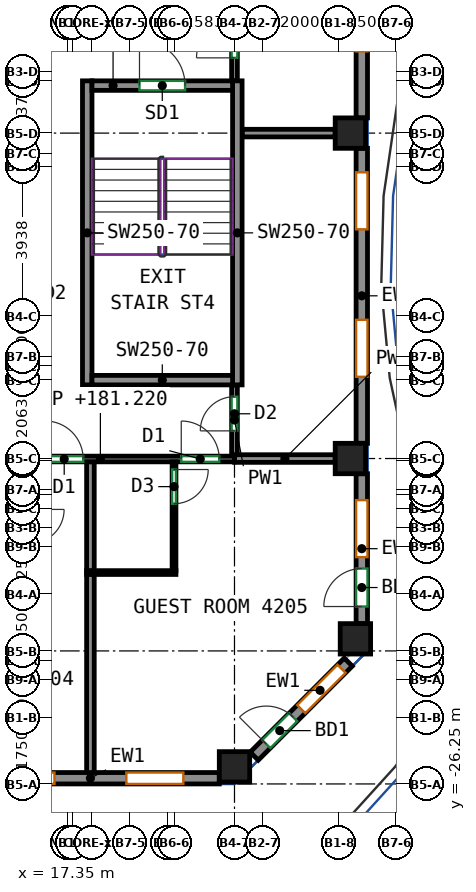
"""IFC4 building model, lengths in metres.
Left out: names, types, materials, properties, quantities, classifications, styles, units other than length and angle.
Written with IfcOpenShell. Run it as: python <this file> out.ifc"""

import sys

from ifc_helpers import new_model, si_unit, direction, frame, frame_2d, origin, origin_2d, place, context, subcontext, project, spatial, rectangle, extrude, source, transform, mapped, element, fill, save


model = new_model("IFC4")
c1 = context("Model", 3, precision=1e-05, world=origin(), true_north=direction((0.0, 1.0)))
c2 = subcontext(c1, "Body", "Model", "MODEL_VIEW")
j1 = project(units=[si_unit("LENGTHUNIT", "METRE"), si_unit("PLANEANGLEUNIT", "RADIAN")], contexts=[c1])
p1 = place(None, origin())
s1 = spatial("IfcSite", under=j1, at=p1, CompositionType="ELEMENT")
p2 = place(p1, origin())
s2 = spatial("IfcBuilding", under=s1, at=p2, CompositionType="ELEMENT")
p3 = place(p2, frame((0.0, 0.0, 178.7)))
s3 = spatial("IfcBuildingStorey", under=s2, at=p3, CompositionType="ELEMENT", Elevation=178.7)
m1 = source(origin(), c2, "Body", "SweptSolid", [
    extrude(rectangle(XDim=0.8, YDim=0.8, at=origin_2d()), origin(), (0.0, 0.0, 1.0), 3.12),
])
for number, where, z_axis, x_axis in (
    (1, (21.75, -25.8, 0.0), (0.0, 0.0, 1.0), (1.0, 0.0, 0.0)),
    (2, (24.8, -17.688, 0.0), (0.0, 0.0, 1.0), (1.0, 0.0, 0.0)),
    (3, (24.8, -9.125, 0.0), (0.0, 0.0, 1.0), (1.0, 0.0, 0.0)),
    (4, (24.932, -22.432, 0.0), (0.0, 0.0, 1.0), (1.0, 0.0, 0.0)),
):
    element("IfcColumn", number, at=place(p3, frame(where, z_axis=z_axis, x_axis=x_axis)), inside=s3, PredefinedType="COLUMN", context=c2, shape_type="MappedRepresentation", body=[
        mapped(m1, transform((0.0, 0.0, 0.0))),
    ])
m2 = source(origin(), c2, "Body", "SweptSolid", [
    extrude(rectangle(XDim=8.0, YDim=0.25, at=frame_2d((4.0, 0.0))), origin(), (0.0, 0.0, 1.0), 3.12),
])
for number, where, z_axis, x_axis in (
    (5, (17.875, -15.75, 0.0), (0.0, 0.0, 1.0), (0.0, 1.0, 0.0)),
    (6, (21.825, -15.75, 0.0), (0.0, 0.0, 1.0), (0.0, 1.0, 0.0)),
):
    element("IfcWall", number, at=place(p3, frame(where, z_axis=z_axis, x_axis=x_axis)), inside=s3, PredefinedType="SHEAR", context=c2, shape_type="MappedRepresentation", body=[
        mapped(m2, transform((0.0, 0.0, 0.0))),
    ])
m3 = source(origin(), c2, "Body", "SweptSolid", [
    extrude(rectangle(XDim=3.7, YDim=0.25, at=frame_2d((1.85, 0.0))), origin(), (0.0, 0.0, 1.0), 3.12),
])
p4 = place(p3, frame((18.0, -15.625, 0.0), z_axis=(0.0, 0.0, 1.0), x_axis=(1.0, 0.0, 0.0)))
e7 = element("IfcWall", 7, at=p4, inside=s3, PredefinedType="SHEAR", context=c2, shape_type="MappedRepresentation", body=[
    mapped(m3, transform((0.0, 0.0, 0.0))),
])
p5 = place(p3, frame((18.0, -7.875, 0.0), z_axis=(0.0, 0.0, 1.0), x_axis=(1.0, 0.0, 0.0)))
e8 = element("IfcWall", 8, at=p5, inside=s3, PredefinedType="SHEAR", context=c2, shape_type="MappedRepresentation", body=[
    mapped(m3, transform((0.0, 0.0, 0.0))),
])
p6 = place(p5, frame((1.25, 0.0, 0.0)))
e9 = element("IfcOpeningElement", 9, at=p6, cuts=e8, PredefinedType="OPENING", context=c2, shape_type="SweptSolid", body=[
    extrude(rectangle(XDim=1.2, YDim=2.1, at=frame_2d((0.6, 1.05))), frame((0.0, 0.135, 0.0), z_axis=(0.0, -1.0, 0.0), x_axis=(1.0, 0.0, 0.0)), (0.0, 0.0, 1.0), 0.27),
])
m4 = source(origin(), c2, "Body", "SweptSolid", [
    extrude(rectangle(XDim=6.783, YDim=0.3, at=frame_2d((3.392, 0.0))), origin(), (0.0, 0.0, 1.0), 3.12),
])
p7 = place(p3, frame((14.567, -26.1, 0.0), z_axis=(0.0, 0.0, 1.0), x_axis=(1.0, 0.0, 0.0)))
e10 = element("IfcWall", 10, at=p7, inside=s3, PredefinedType="SOLIDWALL", context=c2, shape_type="MappedRepresentation", body=[
    mapped(m4, transform((0.0, 0.0, 0.0))),
])
p8 = place(p7, frame((0.946, 0.0, 0.85)))
e11 = element("IfcOpeningElement", 11, at=p8, cuts=e10, PredefinedType="OPENING", context=c2, shape_type="SweptSolid", body=[
    extrude(rectangle(XDim=1.5, YDim=1.95, at=frame_2d((0.75, 0.975))), frame((0.0, 0.16, 0.0), z_axis=(0.0, -1.0, 0.0), x_axis=(1.0, 0.0, 0.0)), (0.0, 0.0, 1.0), 0.32),
])
p9 = place(p7, frame((4.337, 0.0, 0.85)))
e12 = element("IfcOpeningElement", 12, at=p9, cuts=e10, PredefinedType="OPENING", context=c2, shape_type="SweptSolid", body=[
    extrude(rectangle(XDim=1.5, YDim=1.95, at=frame_2d((0.75, 0.975))), frame((0.0, 0.16, 0.0), z_axis=(0.0, -1.0, 0.0), x_axis=(1.0, 0.0, 0.0)), (0.0, 0.0, 1.0), 0.32),
])
m5 = source(origin(), c2, "Body", "SweptSolid", [
    extrude(rectangle(XDim=3.5, YDim=0.3, at=frame_2d((1.75, 0.0))), origin(), (0.0, 0.0, 1.0), 3.12),
])
p10 = place(p3, frame((22.269, -25.519, 0.0), z_axis=(0.0, 0.0, 1.0), x_axis=(0.707141656123, 0.70707190453, 0.0)))
e13 = element("IfcWall", 13, at=p10, inside=s3, PredefinedType="SOLIDWALL", context=c2, shape_type="MappedRepresentation", body=[
    mapped(m5, transform((0.0, 0.0, 0.0))),
])
p11 = place(p10, frame((1.75, 0.0, 0.85)))
e14 = element("IfcOpeningElement", 14, at=p11, cuts=e13, PredefinedType="OPENING", context=c2, shape_type="SweptSolid", body=[
    extrude(rectangle(XDim=1.5, YDim=1.95, at=frame_2d((0.75, 0.975))), frame((0.0, 0.16, 0.0), z_axis=(0.0, -1.0, 0.0), x_axis=(1.0, 0.0, 0.0)), (0.0, 0.0, 1.0), 0.32),
])
p12 = place(p10, frame((0.45, 0.0, 0.0)))
e15 = element("IfcOpeningElement", 15, at=p12, cuts=e13, PredefinedType="OPENING", context=c2, shape_type="SweptSolid", body=[
    extrude(rectangle(XDim=1.0, YDim=2.1, at=frame_2d((0.5, 1.05))), frame((0.0, 0.16, 0.0), z_axis=(0.0, -1.0, 0.0), x_axis=(1.0, 0.0, 0.0)), (0.0, 0.0, 1.0), 0.32),
])
m6 = source(origin(), c2, "Body", "SweptSolid", [
    extrude(rectangle(XDim=3.944, YDim=0.3, at=frame_2d((1.972, 0.0))), origin(), (0.0, 0.0, 1.0), 3.12),
])
p13 = place(p3, frame((25.1, -22.032, 0.0), z_axis=(0.0, 0.0, 1.0), x_axis=(0.0, 1.0, 0.0)))
e16 = element("IfcWall", 16, at=p13, inside=s3, PredefinedType="SOLIDWALL", context=c2, shape_type="MappedRepresentation", body=[
    mapped(m6, transform((0.0, 0.0, 0.0))),
])
p14 = place(p13, frame((1.75, 0.0, 0.85)))
e17 = element("IfcOpeningElement", 17, at=p14, cuts=e16, PredefinedType="OPENING", context=c2, shape_type="SweptSolid", body=[
    extrude(rectangle(XDim=1.5, YDim=1.95, at=frame_2d((0.75, 0.975))), frame((0.0, 0.16, 0.0), z_axis=(0.0, -1.0, 0.0), x_axis=(1.0, 0.0, 0.0)), (0.0, 0.0, 1.0), 0.32),
])
p15 = place(p13, frame((0.45, 0.0, 0.0)))
e18 = element("IfcOpeningElement", 18, at=p15, cuts=e16, PredefinedType="OPENING", context=c2, shape_type="SweptSolid", body=[
    extrude(rectangle(XDim=1.0, YDim=2.1, at=frame_2d((0.5, 1.05))), frame((0.0, 0.16, 0.0), z_axis=(0.0, -1.0, 0.0), x_axis=(1.0, 0.0, 0.0)), (0.0, 0.0, 1.0), 0.32),
])
m7 = source(origin(), c2, "Body", "SweptSolid", [
    extrude(rectangle(XDim=7.763, YDim=0.3, at=frame_2d((3.881, 0.0))), origin(), (0.0, 0.0, 1.0), 3.12),
])
p16 = place(p3, frame((25.1, -17.288, 0.0), z_axis=(0.0, 0.0, 1.0), x_axis=(0.0, 1.0, 0.0)))
e19 = element("IfcWall", 19, at=p16, inside=s3, PredefinedType="SOLIDWALL", context=c2, shape_type="MappedRepresentation", body=[
    mapped(m7, transform((0.0, 0.0, 0.0))),
])
p17 = place(p16, frame((1.75, 0.0, 0.85)))
e20 = element("IfcOpeningElement", 20, at=p17, cuts=e19, PredefinedType="OPENING", context=c2, shape_type="SweptSolid", body=[
    extrude(rectangle(XDim=1.5, YDim=1.95, at=frame_2d((0.75, 0.975))), frame((0.0, 0.16, 0.0), z_axis=(0.0, -1.0, 0.0), x_axis=(1.0, 0.0, 0.0)), (0.0, 0.0, 1.0), 0.32),
])
p18 = place(p16, frame((5.631, 0.0, 0.85)))
e21 = element("IfcOpeningElement", 21, at=p18, cuts=e19, PredefinedType="OPENING", context=c2, shape_type="SweptSolid", body=[
    extrude(rectangle(XDim=1.5, YDim=1.95, at=frame_2d((0.75, 0.975))), frame((0.0, 0.16, 0.0), z_axis=(0.0, -1.0, 0.0), x_axis=(1.0, 0.0, 0.0)), (0.0, 0.0, 1.0), 0.32),
])
p19 = place(p3, frame((25.1, -8.725, 0.0), z_axis=(0.0, 0.0, 1.0), x_axis=(0.0, 1.0, 0.0)))
e22 = element("IfcWall", 22, at=p19, inside=s3, PredefinedType="SOLIDWALL", context=c2, shape_type="MappedRepresentation", body=[
    mapped(m7, transform((0.0, 0.0, 0.0))),
])
p20 = place(p19, frame((1.75, 0.0, 0.85)))
e23 = element("IfcOpeningElement", 23, at=p20, cuts=e22, PredefinedType="OPENING", context=c2, shape_type="SweptSolid", body=[
    extrude(rectangle(XDim=1.5, YDim=1.95, at=frame_2d((0.75, 0.975))), frame((0.0, 0.16, 0.0), z_axis=(0.0, -1.0, 0.0), x_axis=(1.0, 0.0, 0.0)), (0.0, 0.0, 1.0), 0.32),
])
p21 = place(p19, frame((5.631, 0.0, 0.85)))
e24 = element("IfcOpeningElement", 24, at=p21, cuts=e22, PredefinedType="OPENING", context=c2, shape_type="SweptSolid", body=[
    extrude(rectangle(XDim=1.5, YDim=1.95, at=frame_2d((0.75, 0.975))), frame((0.0, 0.16, 0.0), z_axis=(0.0, -1.0, 0.0), x_axis=(1.0, 0.0, 0.0)), (0.0, 0.0, 1.0), 0.32),
])
p22 = place(p19, frame((4.331, 0.0, 0.0)))
e25 = element("IfcOpeningElement", 25, at=p22, cuts=e22, PredefinedType="OPENING", context=c2, shape_type="SweptSolid", body=[
    extrude(rectangle(XDim=1.0, YDim=2.1, at=frame_2d((0.5, 1.05))), frame((0.0, 0.16, 0.0), z_axis=(0.0, -1.0, 0.0), x_axis=(1.0, 0.0, 0.0)), (0.0, 0.0, 1.0), 0.32),
])
p23 = place(p3, frame((14.692, -17.7, 0.0), z_axis=(0.0, 0.0, 1.0), x_axis=(1.0, 0.0, 0.0)))
e26 = element("IfcWall", 26, at=p23, inside=s3, PredefinedType="PARTITIONING", context=c2, shape_type="SweptSolid", body=[
    extrude(rectangle(XDim=7.058, YDim=0.15, at=frame_2d((3.529, 0.0))), origin(), (0.0, 0.0, 1.0), 2.52),
])
p24 = place(p23, frame((2.077, 0.0, 0.0)))
e27 = element("IfcOpeningElement", 27, at=p24, cuts=e26, PredefinedType="OPENING", context=c2, shape_type="SweptSolid", body=[
    extrude(rectangle(XDim=1.0, YDim=2.1, at=frame_2d((0.5, 1.05))), frame((0.0, 0.085, 0.0), z_axis=(0.0, -1.0, 0.0), x_axis=(1.0, 0.0, 0.0)), (0.0, 0.0, 1.0), 0.17),
])
p25 = place(p23, frame((5.657, 0.0, 0.0)))
e28 = element("IfcOpeningElement", 28, at=p25, cuts=e26, PredefinedType="OPENING", context=c2, shape_type="SweptSolid", body=[
    extrude(rectangle(XDim=1.0, YDim=2.1, at=frame_2d((0.5, 1.05))), frame((0.0, 0.085, 0.0), z_axis=(0.0, -1.0, 0.0), x_axis=(1.0, 0.0, 0.0)), (0.0, 0.0, 1.0), 0.17),
])
p26 = place(p3, frame((21.75, -7.75, 0.0), z_axis=(0.0, 0.0, 1.0), x_axis=(0.0, 1.0, 0.0)))
e29 = element("IfcWall", 29, at=p26, inside=s3, PredefinedType="PARTITIONING", context=c2, shape_type="SweptSolid", body=[
    extrude(rectangle(XDim=2.817, YDim=0.15, at=frame_2d((1.408, 0.0))), origin(), (0.0, 0.0, 1.0), 3.12),
])
p27 = place(p26, frame((0.605, 0.0, 0.0)))
e30 = element("IfcOpeningElement", 30, at=p27, cuts=e29, PredefinedType="OPENING", context=c2, shape_type="SweptSolid", body=[
    extrude(rectangle(XDim=1.0, YDim=2.1, at=frame_2d((0.5, 1.05))), frame((0.0, 0.085, 0.0), z_axis=(0.0, -1.0, 0.0), x_axis=(1.0, 0.0, 0.0)), (0.0, 0.0, 1.0), 0.17),
])
p28 = place(p3, frame((21.75, -17.598, 0.0), z_axis=(0.0, 0.0, 1.0), x_axis=(0.0, 1.0, 0.0)))
e31 = element("IfcWall", 31, at=p28, inside=s3, PredefinedType="PARTITIONING", context=c2, shape_type="SweptSolid", body=[
    extrude(rectangle(XDim=1.848, YDim=0.15, at=frame_2d((0.924, 0.0))), origin(), (0.0, 0.0, 1.0), 3.12),
])
p29 = place(p28, frame((0.638, 0.0, 0.0)))
e32 = element("IfcOpeningElement", 32, at=p29, cuts=e31, PredefinedType="OPENING", context=c2, shape_type="SweptSolid", body=[
    extrude(rectangle(XDim=0.9, YDim=2.1, at=frame_2d((0.45, 1.05))), frame((0.0, 0.085, 0.0), z_axis=(0.0, -1.0, 0.0), x_axis=(1.0, 0.0, 0.0)), (0.0, 0.0, 1.0), 0.17),
])
p30 = place(p3, frame((17.959, -26.0, 0.0), z_axis=(0.0, 0.0, 1.0), x_axis=(0.0, 1.0, 0.0)))
e33 = element("IfcWall", 33, at=p30, inside=s3, PredefinedType="PARTITIONING", context=c2, shape_type="SweptSolid", body=[
    extrude(rectangle(XDim=5.272, YDim=0.2, at=frame_2d((2.636, 0.0))), origin(), (0.0, 0.0, 1.0), 3.12),
])
p31 = place(p3, frame((17.959, -20.648, 0.0), z_axis=(0.0, 0.0, 1.0), x_axis=(0.0, 1.0, 0.0)))
e34 = element("IfcWall", 34, at=p31, inside=s3, PredefinedType="PARTITIONING", context=c2, shape_type="SweptSolid", body=[
    extrude(rectangle(XDim=2.871, YDim=0.2, at=frame_2d((1.436, 0.0))), origin(), (0.0, 0.0, 1.0), 3.12),
])
p32 = place(p3, frame((17.859, -20.688, 0.0), z_axis=(0.0, 0.0, 1.0), x_axis=(1.0, 0.0, 0.0)))
e35 = element("IfcWall", 35, at=p32, inside=s3, PredefinedType="PARTITIONING", context=c2, shape_type="SweptSolid", body=[
    extrude(rectangle(XDim=2.35, YDim=0.1, at=frame_2d((1.175, 0.0))), origin(), (0.0, 0.0, 1.0), 3.12),
])
p33 = place(p3, frame((20.159, -17.777, 0.0), z_axis=(0.0, 0.0, 1.0), x_axis=(0.0, -1.0, 0.0)))
e36 = element("IfcWall", 36, at=p33, inside=s3, PredefinedType="PARTITIONING", context=c2, shape_type="SweptSolid", body=[
    extrude(rectangle(XDim=2.861, YDim=0.1, at=frame_2d((1.43, 0.0))), origin(), (0.0, 0.0, 1.0), 3.12),
])
p34 = place(p33, frame((0.2, 0.0, 0.0)))
e37 = element("IfcOpeningElement", 37, at=p34, cuts=e36, PredefinedType="OPENING", context=c2, shape_type="SweptSolid", body=[
    extrude(rectangle(XDim=0.9, YDim=2.1, at=frame_2d((0.45, 1.05))), frame((0.0, 0.06, 0.0), z_axis=(0.0, -1.0, 0.0), x_axis=(1.0, 0.0, 0.0)), (0.0, 0.0, 1.0), 0.12),
])
p35 = place(p3, frame((21.752, -17.688, 0.0), z_axis=(0.0, 0.0, 1.0), x_axis=(1.0, 0.0, 0.0)))
e38 = element("IfcWall", 38, at=p35, inside=s3, PredefinedType="PARTITIONING", context=c2, shape_type="SweptSolid", body=[
    extrude(rectangle(XDim=2.648, YDim=0.2, at=frame_2d((1.324, 0.0))), origin(), (0.0, 0.0, 1.0), 2.52),
])
p36 = place(p3, frame((21.95, -9.125, 0.0), z_axis=(0.0, 0.0, 1.0), x_axis=(1.0, 0.0, 0.0)))
e39 = element("IfcWall", 39, at=p36, inside=s3, PredefinedType="PARTITIONING", context=c2, shape_type="SweptSolid", body=[
    extrude(rectangle(XDim=2.45, YDim=0.2, at=frame_2d((1.225, 0.0))), origin(), (0.0, 0.0, 1.0), 3.12),
])
p37 = place(p8, origin())
e40 = element("IfcWindow", 40, at=p37, inside=s3, PartitioningType="SINGLE_PANEL", PredefinedType="WINDOW", context=c2, shape_type="SweptSolid", body=[
    extrude(rectangle(XDim=1.5, YDim=1.95, at=frame_2d((0.75, 0.975))), frame((0.0, 0.03, 0.0), z_axis=(0.0, -1.0, 0.0), x_axis=(1.0, 0.0, 0.0)), (0.0, 0.0, 1.0), 0.06),
])
fill(e11, e40)
p38 = place(p9, origin())
e41 = element("IfcWindow", 41, at=p38, inside=s3, PartitioningType="SINGLE_PANEL", PredefinedType="WINDOW", context=c2, shape_type="SweptSolid", body=[
    extrude(rectangle(XDim=1.5, YDim=1.95, at=frame_2d((0.75, 0.975))), frame((0.0, 0.03, 0.0), z_axis=(0.0, -1.0, 0.0), x_axis=(1.0, 0.0, 0.0)), (0.0, 0.0, 1.0), 0.06),
])
fill(e12, e41)
p39 = place(p11, origin())
e42 = element("IfcWindow", 42, at=p39, inside=s3, PartitioningType="SINGLE_PANEL", PredefinedType="WINDOW", context=c2, shape_type="SweptSolid", body=[
    extrude(rectangle(XDim=1.5, YDim=1.95, at=frame_2d((0.75, 0.975))), frame((0.0, 0.03, 0.0), z_axis=(0.0, -1.0, 0.0), x_axis=(1.0, 0.0, 0.0)), (0.0, 0.0, 1.0), 0.06),
])
fill(e14, e42)
p40 = place(p12, origin())
e43 = element("IfcDoor", 43, at=p40, inside=s3, OperationType="SINGLE_SWING_LEFT", PredefinedType="DOOR", context=c2, shape_type="SweptSolid", body=[
    extrude(rectangle(XDim=1.0, YDim=2.1, at=frame_2d((0.5, 1.05))), frame((0.0, 0.025, 0.0), z_axis=(0.0, -1.0, 0.0), x_axis=(1.0, 0.0, 0.0)), (0.0, 0.0, 1.0), 0.05),
])
fill(e15, e43)
p41 = place(p14, origin())
e44 = element("IfcWindow", 44, at=p41, inside=s3, PartitioningType="SINGLE_PANEL", PredefinedType="WINDOW", context=c2, shape_type="SweptSolid", body=[
    extrude(rectangle(XDim=1.5, YDim=1.95, at=frame_2d((0.75, 0.975))), frame((0.0, 0.03, 0.0), z_axis=(0.0, -1.0, 0.0), x_axis=(1.0, 0.0, 0.0)), (0.0, 0.0, 1.0), 0.06),
])
fill(e17, e44)
p42 = place(p15, origin())
e45 = element("IfcDoor", 45, at=p42, inside=s3, OperationType="SINGLE_SWING_LEFT", PredefinedType="DOOR", context=c2, shape_type="SweptSolid", body=[
    extrude(rectangle(XDim=1.0, YDim=2.1, at=frame_2d((0.5, 1.05))), frame((0.0, 0.025, 0.0), z_axis=(0.0, -1.0, 0.0), x_axis=(1.0, 0.0, 0.0)), (0.0, 0.0, 1.0), 0.05),
])
fill(e18, e45)
p43 = place(p17, origin())
e46 = element("IfcWindow", 46, at=p43, inside=s3, PartitioningType="SINGLE_PANEL", PredefinedType="WINDOW", context=c2, shape_type="SweptSolid", body=[
    extrude(rectangle(XDim=1.5, YDim=1.95, at=frame_2d((0.75, 0.975))), frame((0.0, 0.03, 0.0), z_axis=(0.0, -1.0, 0.0), x_axis=(1.0, 0.0, 0.0)), (0.0, 0.0, 1.0), 0.06),
])
fill(e20, e46)
p44 = place(p18, origin())
e47 = element("IfcWindow", 47, at=p44, inside=s3, PartitioningType="SINGLE_PANEL", PredefinedType="WINDOW", context=c2, shape_type="SweptSolid", body=[
    extrude(rectangle(XDim=1.5, YDim=1.95, at=frame_2d((0.75, 0.975))), frame((0.0, 0.03, 0.0), z_axis=(0.0, -1.0, 0.0), x_axis=(1.0, 0.0, 0.0)), (0.0, 0.0, 1.0), 0.06),
])
fill(e21, e47)
p45 = place(p6, origin())
e48 = element("IfcDoor", 48, at=p45, inside=s3, OperationType="DOUBLE_DOOR_SINGLE_SWING", PredefinedType="DOOR", context=c2, shape_type="SweptSolid", body=[
    extrude(rectangle(XDim=1.2, YDim=2.1, at=frame_2d((0.6, 1.05))), frame((0.0, 0.025, 0.0), z_axis=(0.0, -1.0, 0.0), x_axis=(1.0, 0.0, 0.0)), (0.0, 0.0, 1.0), 0.05),
])
fill(e9, e48)
p46 = place(p34, origin())
e49 = element("IfcDoor", 49, at=p46, inside=s3, OperationType="SINGLE_SWING_LEFT", PredefinedType="DOOR", context=c2, shape_type="SweptSolid", body=[
    extrude(rectangle(XDim=0.9, YDim=2.1, at=frame_2d((0.45, 1.05))), frame((0.0, 0.025, 0.0), z_axis=(0.0, -1.0, 0.0), x_axis=(1.0, 0.0, 0.0)), (0.0, 0.0, 1.0), 0.05),
])
fill(e37, e49)
p47 = place(p24, origin())
e50 = element("IfcDoor", 50, at=p47, inside=s3, OperationType="SINGLE_SWING_LEFT", PredefinedType="DOOR", context=c2, shape_type="SweptSolid", body=[
    extrude(rectangle(XDim=1.0, YDim=2.1, at=frame_2d((0.5, 1.05))), frame((0.0, 0.025, 0.0), z_axis=(0.0, -1.0, 0.0), x_axis=(1.0, 0.0, 0.0)), (0.0, 0.0, 1.0), 0.05),
])
fill(e27, e50)
p48 = place(p25, origin())
e51 = element("IfcDoor", 51, at=p48, inside=s3, OperationType="SINGLE_SWING_LEFT", PredefinedType="DOOR", context=c2, shape_type="SweptSolid", body=[
    extrude(rectangle(XDim=1.0, YDim=2.1, at=frame_2d((0.5, 1.05))), frame((0.0, 0.025, 0.0), z_axis=(0.0, -1.0, 0.0), x_axis=(1.0, 0.0, 0.0)), (0.0, 0.0, 1.0), 0.05),
])
fill(e28, e51)
p49 = place(p29, origin())
e52 = element("IfcDoor", 52, at=p49, inside=s3, OperationType="SINGLE_SWING_LEFT", PredefinedType="DOOR", context=c2, shape_type="SweptSolid", body=[
    extrude(rectangle(XDim=0.9, YDim=2.1, at=frame_2d((0.45, 1.05))), frame((0.0, 0.025, 0.0), z_axis=(0.0, -1.0, 0.0), x_axis=(1.0, 0.0, 0.0)), (0.0, 0.0, 1.0), 0.05),
])
fill(e32, e52)
p50 = place(p27, origin())
e53 = element("IfcDoor", 53, at=p50, inside=s3, OperationType="SINGLE_SWING_LEFT", PredefinedType="DOOR", context=c2, shape_type="SweptSolid", body=[
    extrude(rectangle(XDim=1.0, YDim=2.1, at=frame_2d((0.5, 1.05))), frame((0.0, 0.025, 0.0), z_axis=(0.0, -1.0, 0.0), x_axis=(1.0, 0.0, 0.0)), (0.0, 0.0, 1.0), 0.05),
])
fill(e30, e53)
save(model, sys.argv[1])
